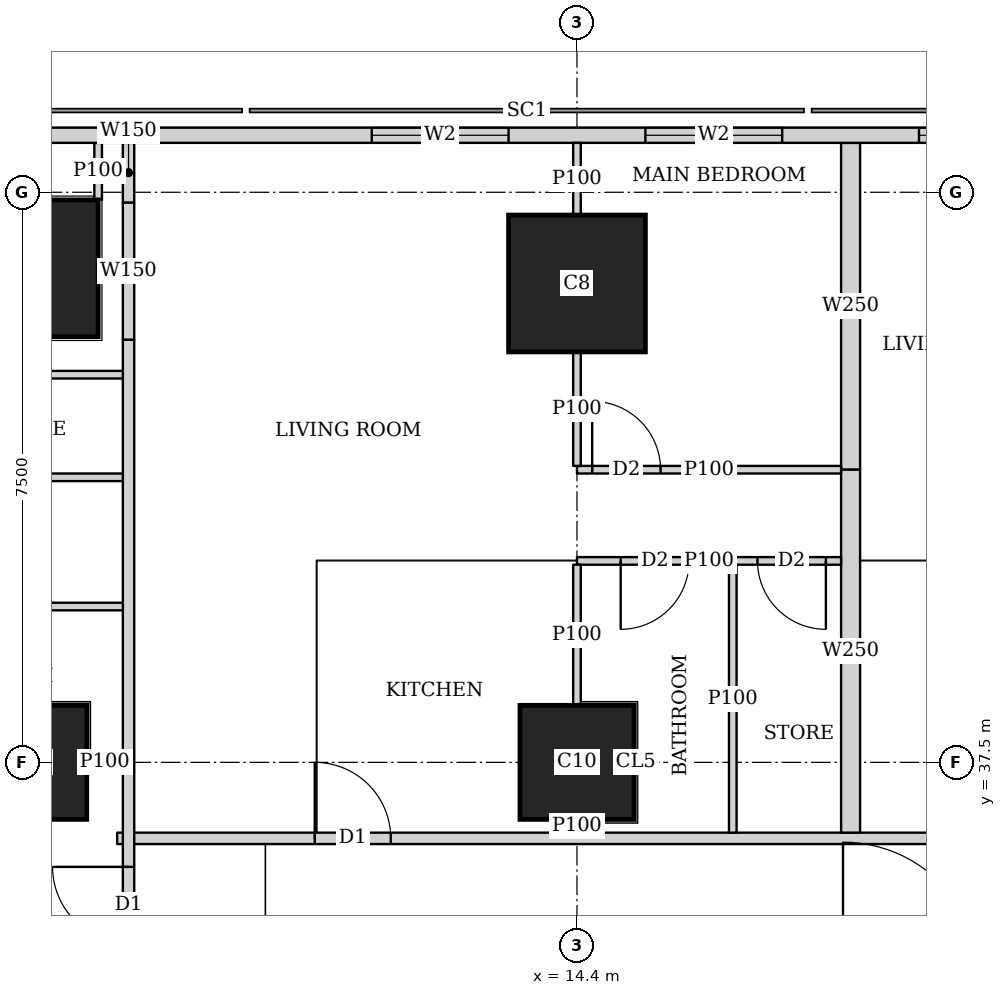
"""IFC4 building model, lengths in metres.
Left out: names, types, materials, properties, quantities, classifications, styles, units other than length and angle.
Written with IfcOpenShell. Run it as: python <this file> out.ifc"""

import sys

from ifc_helpers import new_model, si_unit, direction, frame, frame_2d, origin, origin_2d, place, context, subcontext, project, spatial, rectangle, extrude, element, fill, save


model = new_model("IFC4")
c1 = context("Model", 3, precision=1e-05, world=origin(), true_north=direction((0.0, 1.0)))
c2 = subcontext(c1, "Body", "Model", "MODEL_VIEW")
j1 = project(units=[si_unit("LENGTHUNIT", "METRE"), si_unit("PLANEANGLEUNIT", "RADIAN")], contexts=[c1])
p1 = place(None, origin())
s1 = spatial("IfcSite", under=j1, at=p1, CompositionType="ELEMENT")
p2 = place(p1, origin())
s2 = spatial("IfcBuilding", under=s1, at=p2, CompositionType="ELEMENT")
p3 = place(p2, frame((0.0, 0.0, 139.55)))
s3 = spatial("IfcBuildingStorey", under=s2, at=p3, CompositionType="ELEMENT", Elevation=139.55)
for number, where, z_axis, x_axis in (
    (1, (7.2, 37.5, 0.0), (0.0, 0.0, 1.0), (1.0, 0.0, 0.0)),
    (2, (14.4, 37.5, 0.0), (0.0, 0.0, 1.0), (1.0, 0.0, 0.0)),
):
    element("IfcColumn", number, at=place(p3, frame(where, z_axis=z_axis, x_axis=x_axis)), inside=s3, PredefinedType="COLUMN", context=c2, shape_type="SweptSolid", body=[
        extrude(rectangle(XDim=1.5, YDim=1.5, at=origin_2d()), origin(), (0.0, 0.0, 1.0), 3.75),
    ])
for number, where, z_axis, x_axis in (
    (3, (7.2, 44.0, 0.0), (0.0, 0.0, 1.0), (1.0, 0.0, 0.0)),
    (4, (14.4, 43.8, 0.0), (0.0, 0.0, 1.0), (1.0, 0.0, 0.0)),
):
    element("IfcColumn", number, at=place(p3, frame(where, z_axis=z_axis, x_axis=x_axis)), inside=s3, PredefinedType="COLUMN", context=c2, shape_type="SweptSolid", body=[
        extrude(rectangle(XDim=1.8, YDim=1.8, at=origin_2d()), origin(), (0.0, 0.0, 1.0), 3.75),
    ])
p4 = place(p3, frame((40.106, 45.75, 0.0), z_axis=(0.0, 0.0, 1.0), x_axis=(-1.0, 0.0, 0.0)))
e5 = element("IfcWall", 5, at=p4, inside=s3, PredefinedType="SOLIDWALL", context=c2, shape_type="SweptSolid", body=[
    extrude(rectangle(XDim=37.943, YDim=0.2, at=frame_2d((18.971, 0.0))), origin(), (0.0, 0.0, 1.0), 3.5),
])
p5 = place(p4, frame((8.606, 0.0, 0.9)))
e6 = element("IfcOpeningElement", 6, at=p5, cuts=e5, PredefinedType="OPENING", context=c2, shape_type="SweptSolid", body=[
    extrude(rectangle(XDim=1.8, YDim=1.5, at=frame_2d((0.9, 0.75))), frame((0.0, 0.11, 0.0), z_axis=(0.0, -1.0, 0.0), x_axis=(1.0, 0.0, 0.0)), (0.0, 0.0, 1.0), 0.22),
])
p6 = place(p4, frame((12.206, 0.0, 0.9)))
e7 = element("IfcOpeningElement", 7, at=p6, cuts=e5, PredefinedType="OPENING", context=c2, shape_type="SweptSolid", body=[
    extrude(rectangle(XDim=1.8, YDim=1.5, at=frame_2d((0.9, 0.75))), frame((0.0, 0.11, 0.0), z_axis=(0.0, -1.0, 0.0), x_axis=(1.0, 0.0, 0.0)), (0.0, 0.0, 1.0), 0.22),
])
p7 = place(p4, frame((15.806, 0.0, 0.9)))
e8 = element("IfcOpeningElement", 8, at=p7, cuts=e5, PredefinedType="OPENING", context=c2, shape_type="SweptSolid", body=[
    extrude(rectangle(XDim=1.8, YDim=1.5, at=frame_2d((0.9, 0.75))), frame((0.0, 0.11, 0.0), z_axis=(0.0, -1.0, 0.0), x_axis=(1.0, 0.0, 0.0)), (0.0, 0.0, 1.0), 0.22),
])
p8 = place(p4, frame((19.406, 0.0, 0.9)))
e9 = element("IfcOpeningElement", 9, at=p8, cuts=e5, PredefinedType="OPENING", context=c2, shape_type="SweptSolid", body=[
    extrude(rectangle(XDim=1.8, YDim=1.5, at=frame_2d((0.9, 0.75))), frame((0.0, 0.11, 0.0), z_axis=(0.0, -1.0, 0.0), x_axis=(1.0, 0.0, 0.0)), (0.0, 0.0, 1.0), 0.22),
])
p9 = place(p4, frame((23.006, 0.0, 0.9)))
e10 = element("IfcOpeningElement", 10, at=p9, cuts=e5, PredefinedType="OPENING", context=c2, shape_type="SweptSolid", body=[
    extrude(rectangle(XDim=1.8, YDim=1.5, at=frame_2d((0.9, 0.75))), frame((0.0, 0.11, 0.0), z_axis=(0.0, -1.0, 0.0), x_axis=(1.0, 0.0, 0.0)), (0.0, 0.0, 1.0), 0.22),
])
p10 = place(p4, frame((26.606, 0.0, 0.9)))
e11 = element("IfcOpeningElement", 11, at=p10, cuts=e5, PredefinedType="OPENING", context=c2, shape_type="SweptSolid", body=[
    extrude(rectangle(XDim=1.8, YDim=1.5, at=frame_2d((0.9, 0.75))), frame((0.0, 0.11, 0.0), z_axis=(0.0, -1.0, 0.0), x_axis=(1.0, 0.0, 0.0)), (0.0, 0.0, 1.0), 0.22),
])
p11 = place(p3, frame((8.5, 1.964, 0.0), z_axis=(0.0, 0.0, 1.0), x_axis=(0.0, 1.0, 0.0)))
e12 = element("IfcWall", 12, at=p11, inside=s3, PredefinedType="SOLIDWALL", context=c2, shape_type="SweptSolid", body=[
    extrude(rectangle(XDim=41.097, YDim=0.15, at=frame_2d((20.548, 0.0))), origin(), (0.0, 0.0, 1.0), 3.5),
])
p12 = place(p11, frame((6.911, 0.0, 0.0)))
e13 = element("IfcOpeningElement", 13, at=p12, cuts=e12, PredefinedType="OPENING", context=c2, shape_type="SweptSolid", body=[
    extrude(rectangle(XDim=1.0, YDim=2.1, at=frame_2d((0.5, 1.05))), frame((0.0, 0.085, 0.0), z_axis=(0.0, -1.0, 0.0), x_axis=(1.0, 0.0, 0.0)), (0.0, 0.0, 1.0), 0.17),
])
p13 = place(p11, frame((10.661, 0.0, 0.0)))
e14 = element("IfcOpeningElement", 14, at=p13, cuts=e12, PredefinedType="OPENING", context=c2, shape_type="SweptSolid", body=[
    extrude(rectangle(XDim=1.0, YDim=2.1, at=frame_2d((0.5, 1.05))), frame((0.0, 0.085, 0.0), z_axis=(0.0, -1.0, 0.0), x_axis=(1.0, 0.0, 0.0)), (0.0, 0.0, 1.0), 0.17),
])
p14 = place(p11, frame((25.661, 0.0, 0.0)))
e15 = element("IfcOpeningElement", 15, at=p14, cuts=e12, PredefinedType="OPENING", context=c2, shape_type="SweptSolid", body=[
    extrude(rectangle(XDim=1.0, YDim=2.1, at=frame_2d((0.5, 1.05))), frame((0.0, 0.085, 0.0), z_axis=(0.0, -1.0, 0.0), x_axis=(1.0, 0.0, 0.0)), (0.0, 0.0, 1.0), 0.17),
])
p15 = place(p11, frame((33.161, 0.0, 0.0)))
e16 = element("IfcOpeningElement", 16, at=p15, cuts=e12, PredefinedType="OPENING", context=c2, shape_type="SweptSolid", body=[
    extrude(rectangle(XDim=1.0, YDim=2.1, at=frame_2d((0.5, 1.05))), frame((0.0, 0.085, 0.0), z_axis=(0.0, -1.0, 0.0), x_axis=(1.0, 0.0, 0.0)), (0.0, 0.0, 1.0), 0.17),
])
p16 = place(p3, frame((8.5, 43.061, 0.0), z_axis=(0.0, 0.0, 1.0), x_axis=(0.0, 1.0, 0.0)))
e17 = element("IfcWall", 17, at=p16, inside=s3, PredefinedType="SOLIDWALL", context=c2, shape_type="SweptSolid", body=[
    extrude(rectangle(XDim=1.805, YDim=0.15, at=frame_2d((0.902, 0.0))), origin(), (0.0, 0.0, 1.0), 2.1),
])
p17 = place(p3, frame((8.5, 44.866, 0.0), z_axis=(0.0, 0.0, 1.0), x_axis=(0.0, 1.0, 0.0)))
e18 = element("IfcWall", 18, at=p17, inside=s3, PredefinedType="SOLIDWALL", context=c2, shape_type="SweptSolid", body=[
    extrude(rectangle(XDim=0.784, YDim=0.15, at=frame_2d((0.392, 0.0))), origin(), (0.0, 0.0, 1.0), 3.5),
])
p18 = place(p3, frame((8.35, 36.5, 0.0), z_axis=(0.0, 0.0, 1.0), x_axis=(1.0, 0.0, 0.0)))
e19 = element("IfcWall", 19, at=p18, inside=s3, PredefinedType="SOLIDWALL", context=c2, shape_type="SweptSolid", body=[
    extrude(rectangle(XDim=26.415, YDim=0.15, at=frame_2d((13.208, 0.0))), origin(), (0.0, 0.0, 1.0), 3.5),
])
p19 = place(p18, frame((2.6, 0.0, 0.0)))
e20 = element("IfcOpeningElement", 20, at=p19, cuts=e19, PredefinedType="OPENING", context=c2, shape_type="SweptSolid", body=[
    extrude(rectangle(XDim=1.0, YDim=2.1, at=frame_2d((0.5, 1.05))), frame((0.0, 0.085, 0.0), z_axis=(0.0, -1.0, 0.0), x_axis=(1.0, 0.0, 0.0)), (0.0, 0.0, 1.0), 0.17),
])
p20 = place(p18, frame((10.75, 0.0, 0.0)))
e21 = element("IfcOpeningElement", 21, at=p20, cuts=e19, PredefinedType="OPENING", context=c2, shape_type="SweptSolid", body=[
    extrude(rectangle(XDim=1.0, YDim=2.1, at=frame_2d((0.5, 1.05))), frame((0.0, 0.085, 0.0), z_axis=(0.0, -1.0, 0.0), x_axis=(1.0, 0.0, 0.0)), (0.0, 0.0, 1.0), 0.17),
])
p21 = place(p3, frame((8.1, 45.65, 0.0), z_axis=(0.0, 0.0, 1.0), x_axis=(0.0, -1.0, 0.0)))
e22 = element("IfcWall", 22, at=p21, inside=s3, PredefinedType="PARTITIONING", context=c2, shape_type="SweptSolid", body=[
    extrude(rectangle(XDim=0.749, YDim=0.1, at=frame_2d((0.375, 0.0))), origin(), (0.0, 0.0, 1.0), 3.5),
])
p22 = place(p3, frame((7.951, 37.5, 0.0), z_axis=(0.0, 0.0, 1.0), x_axis=(1.0, 0.0, 0.0)))
e23 = element("IfcWall", 23, at=p22, inside=s3, PredefinedType="PARTITIONING", context=c2, shape_type="SweptSolid", body=[
    extrude(rectangle(XDim=0.474, YDim=0.1, at=frame_2d((0.237, 0.0))), origin(), (0.0, 0.0, 1.0), 3.5),
])
for number, where, z_axis, x_axis in (
    (24, (4.9, 41.25, 0.0), (0.0, 0.0, 1.0), (1.0, 0.0, 0.0)),
    (25, (4.9, 39.55, 0.0), (0.0, 0.0, 1.0), (1.0, 0.0, 0.0)),
):
    element("IfcWall", number, at=place(p3, frame(where, z_axis=z_axis, x_axis=x_axis)), inside=s3, PredefinedType="PARTITIONING", context=c2, shape_type="SweptSolid", body=[
        extrude(rectangle(XDim=3.525, YDim=0.1, at=frame_2d((1.763, 0.0))), origin(), (0.0, 0.0, 1.0), 3.5),
    ])
p23 = place(p3, frame((14.4, 41.35, 0.0), z_axis=(0.0, 0.0, 1.0), x_axis=(1.0, 0.0, 0.0)))
e26 = element("IfcWall", 26, at=p23, inside=s3, PredefinedType="PARTITIONING", context=c2, shape_type="SweptSolid", body=[
    extrude(rectangle(XDim=3.475, YDim=0.1, at=frame_2d((1.738, 0.0))), origin(), (0.0, 0.0, 1.0), 3.5),
])
p24 = place(p23, frame((0.2, 0.0, 0.0)))
e27 = element("IfcOpeningElement", 27, at=p24, cuts=e26, PredefinedType="OPENING", context=c2, shape_type="SweptSolid", body=[
    extrude(rectangle(XDim=0.9, YDim=2.1, at=frame_2d((0.45, 1.05))), frame((0.0, 0.06, 0.0), z_axis=(0.0, -1.0, 0.0), x_axis=(1.0, 0.0, 0.0)), (0.0, 0.0, 1.0), 0.12),
])
p25 = place(p3, frame((14.4, 40.15, 0.0), z_axis=(0.0, 0.0, 1.0), x_axis=(1.0, 0.0, 0.0)))
e28 = element("IfcWall", 28, at=p25, inside=s3, PredefinedType="PARTITIONING", context=c2, shape_type="SweptSolid", body=[
    extrude(rectangle(XDim=3.475, YDim=0.1, at=frame_2d((1.738, 0.0))), origin(), (0.0, 0.0, 1.0), 3.5),
])
p26 = place(p25, frame((0.575, 0.0, 0.0)))
e29 = element("IfcOpeningElement", 29, at=p26, cuts=e28, PredefinedType="OPENING", context=c2, shape_type="SweptSolid", body=[
    extrude(rectangle(XDim=0.9, YDim=2.1, at=frame_2d((0.45, 1.05))), frame((0.0, 0.06, 0.0), z_axis=(0.0, -1.0, 0.0), x_axis=(1.0, 0.0, 0.0)), (0.0, 0.0, 1.0), 0.12),
])
p27 = place(p25, frame((2.375, 0.0, 0.0)))
e30 = element("IfcOpeningElement", 30, at=p27, cuts=e28, PredefinedType="OPENING", context=c2, shape_type="SweptSolid", body=[
    extrude(rectangle(XDim=0.9, YDim=2.1, at=frame_2d((0.45, 1.05))), frame((0.0, 0.06, 0.0), z_axis=(0.0, -1.0, 0.0), x_axis=(1.0, 0.0, 0.0)), (0.0, 0.0, 1.0), 0.12),
])
p28 = place(p3, frame((14.4, 41.4, 0.0), z_axis=(0.0, 0.0, 1.0), x_axis=(0.0, 1.0, 0.0)))
e31 = element("IfcWall", 31, at=p28, inside=s3, PredefinedType="PARTITIONING", context=c2, shape_type="SweptSolid", body=[
    extrude(rectangle(XDim=1.499, YDim=0.1, at=frame_2d((0.75, 0.0))), origin(), (0.0, 0.0, 1.0), 3.5),
])
p29 = place(p3, frame((14.4, 44.701, 0.0), z_axis=(0.0, 0.0, 1.0), x_axis=(0.0, 1.0, 0.0)))
e32 = element("IfcWall", 32, at=p29, inside=s3, PredefinedType="PARTITIONING", context=c2, shape_type="SweptSolid", body=[
    extrude(rectangle(XDim=0.949, YDim=0.1, at=frame_2d((0.475, 0.0))), origin(), (0.0, 0.0, 1.0), 3.5),
])
p30 = place(p3, frame((14.4, 36.575, 0.0), z_axis=(0.0, 0.0, 1.0), x_axis=(0.0, 1.0, 0.0)))
e33 = element("IfcWall", 33, at=p30, inside=s3, PredefinedType="PARTITIONING", context=c2, shape_type="SweptSolid", body=[
    extrude(rectangle(XDim=0.174, YDim=0.1, at=frame_2d((0.087, 0.0))), origin(), (0.0, 0.0, 1.0), 3.5),
])
p31 = place(p3, frame((14.4, 38.251, 0.0), z_axis=(0.0, 0.0, 1.0), x_axis=(0.0, 1.0, 0.0)))
e34 = element("IfcWall", 34, at=p31, inside=s3, PredefinedType="PARTITIONING", context=c2, shape_type="SweptSolid", body=[
    extrude(rectangle(XDim=1.849, YDim=0.1, at=frame_2d((0.925, 0.0))), origin(), (0.0, 0.0, 1.0), 3.5),
])
p32 = place(p3, frame((16.45, 36.575, 0.0), z_axis=(0.0, 0.0, 1.0), x_axis=(0.0, 1.0, 0.0)))
e35 = element("IfcWall", 35, at=p32, inside=s3, PredefinedType="PARTITIONING", context=c2, shape_type="SweptSolid", body=[
    extrude(rectangle(XDim=3.525, YDim=0.1, at=frame_2d((1.763, 0.0))), origin(), (0.0, 0.0, 1.0), 3.5),
])
p33 = place(p3, frame((18.0, 41.35, 0.0), z_axis=(0.0, 0.0, 1.0), x_axis=(0.0, 1.0, 0.0)))
e36 = element("IfcWall", 36, at=p33, inside=s3, PredefinedType="SOLIDWALL", context=c2, shape_type="SweptSolid", body=[
    extrude(rectangle(XDim=4.3, YDim=0.25, at=frame_2d((2.15, 0.0))), origin(), (0.0, 0.0, 1.0), 2.1),
])
p34 = place(p3, frame((18.0, 36.575, 0.0), z_axis=(0.0, 0.0, 1.0), x_axis=(0.0, 1.0, 0.0)))
e37 = element("IfcWall", 37, at=p34, inside=s3, PredefinedType="SOLIDWALL", context=c2, shape_type="SweptSolid", body=[
    extrude(rectangle(XDim=4.775, YDim=0.25, at=frame_2d((2.388, 0.0))), origin(), (0.0, 0.0, 1.0), 3.5),
])
p35 = place(p3, frame((8.425, 42.6, 0.0), z_axis=(0.0, 0.0, 1.0), x_axis=(-1.0, 0.0, 0.0)))
e38 = element("IfcWall", 38, at=p35, inside=s3, PredefinedType="PARTITIONING", context=c2, shape_type="SweptSolid", body=[
    extrude(rectangle(XDim=3.022, YDim=0.1, at=frame_2d((1.511, 0.0))), origin(), (0.0, 0.0, 1.0), 3.5),
])
p36 = place(p35, frame((1.95, 0.0, 0.0)))
e39 = element("IfcOpeningElement", 39, at=p36, cuts=e38, PredefinedType="OPENING", context=c2, shape_type="SweptSolid", body=[
    extrude(rectangle(XDim=0.9, YDim=2.1, at=frame_2d((0.45, 1.05))), frame((0.0, 0.06, 0.0), z_axis=(0.0, -1.0, 0.0), x_axis=(1.0, 0.0, 0.0)), (0.0, 0.0, 1.0), 0.12),
])
p37 = place(p8, origin())
e40 = element("IfcWindow", 40, at=p37, inside=s3, PartitioningType="SINGLE_PANEL", PredefinedType="WINDOW", context=c2, shape_type="SweptSolid", body=[
    extrude(rectangle(XDim=1.8, YDim=1.5, at=frame_2d((0.9, 0.75))), frame((0.0, 0.03, 0.0), z_axis=(0.0, -1.0, 0.0), x_axis=(1.0, 0.0, 0.0)), (0.0, 0.0, 1.0), 0.06),
])
fill(e9, e40)
p38 = place(p9, origin())
e41 = element("IfcWindow", 41, at=p38, inside=s3, PartitioningType="SINGLE_PANEL", PredefinedType="WINDOW", context=c2, shape_type="SweptSolid", body=[
    extrude(rectangle(XDim=1.8, YDim=1.5, at=frame_2d((0.9, 0.75))), frame((0.0, 0.03, 0.0), z_axis=(0.0, -1.0, 0.0), x_axis=(1.0, 0.0, 0.0)), (0.0, 0.0, 1.0), 0.06),
])
fill(e10, e41)
p39 = place(p10, origin())
e42 = element("IfcWindow", 42, at=p39, inside=s3, PartitioningType="SINGLE_PANEL", PredefinedType="WINDOW", context=c2, shape_type="SweptSolid", body=[
    extrude(rectangle(XDim=1.8, YDim=1.5, at=frame_2d((0.9, 0.75))), frame((0.0, 0.03, 0.0), z_axis=(0.0, -1.0, 0.0), x_axis=(1.0, 0.0, 0.0)), (0.0, 0.0, 1.0), 0.06),
])
fill(e11, e42)
p40 = place(p15, origin())
e43 = element("IfcDoor", 43, at=p40, inside=s3, OperationType="SINGLE_SWING_RIGHT", PredefinedType="DOOR", context=c2, shape_type="SweptSolid", body=[
    extrude(rectangle(XDim=1.0, YDim=2.1, at=frame_2d((0.5, 1.05))), frame((0.0, 0.025, 0.0), z_axis=(0.0, -1.0, 0.0), x_axis=(1.0, 0.0, 0.0)), (0.0, 0.0, 1.0), 0.05),
])
fill(e16, e43)
p41 = place(p24, origin())
e44 = element("IfcDoor", 44, at=p41, inside=s3, OperationType="SINGLE_SWING_LEFT", PredefinedType="DOOR", context=c2, shape_type="SweptSolid", body=[
    extrude(rectangle(XDim=0.9, YDim=2.1, at=frame_2d((0.45, 1.05))), frame((0.0, 0.025, 0.0), z_axis=(0.0, -1.0, 0.0), x_axis=(1.0, 0.0, 0.0)), (0.0, 0.0, 1.0), 0.05),
])
fill(e27, e44)
p42 = place(p26, origin())
e45 = element("IfcDoor", 45, at=p42, inside=s3, OperationType="SINGLE_SWING_RIGHT", PredefinedType="DOOR", context=c2, shape_type="SweptSolid", body=[
    extrude(rectangle(XDim=0.9, YDim=2.1, at=frame_2d((0.45, 1.05))), frame((0.0, 0.025, 0.0), z_axis=(0.0, -1.0, 0.0), x_axis=(1.0, 0.0, 0.0)), (0.0, 0.0, 1.0), 0.05),
])
fill(e29, e45)
p43 = place(p27, origin())
e46 = element("IfcDoor", 46, at=p43, inside=s3, OperationType="SINGLE_SWING_LEFT", PredefinedType="DOOR", context=c2, shape_type="SweptSolid", body=[
    extrude(rectangle(XDim=0.9, YDim=2.1, at=frame_2d((0.45, 1.05))), frame((0.0, 0.025, 0.0), z_axis=(0.0, -1.0, 0.0), x_axis=(1.0, 0.0, 0.0)), (0.0, 0.0, 1.0), 0.05),
])
fill(e30, e46)
p44 = place(p19, origin())
e47 = element("IfcDoor", 47, at=p44, inside=s3, OperationType="SINGLE_SWING_LEFT", PredefinedType="DOOR", context=c2, shape_type="SweptSolid", body=[
    extrude(rectangle(XDim=1.0, YDim=2.1, at=frame_2d((0.5, 1.05))), frame((0.0, 0.025, 0.0), z_axis=(0.0, -1.0, 0.0), x_axis=(1.0, 0.0, 0.0)), (0.0, 0.0, 1.0), 0.05),
])
fill(e20, e47)
save(model, sys.argv[1])
